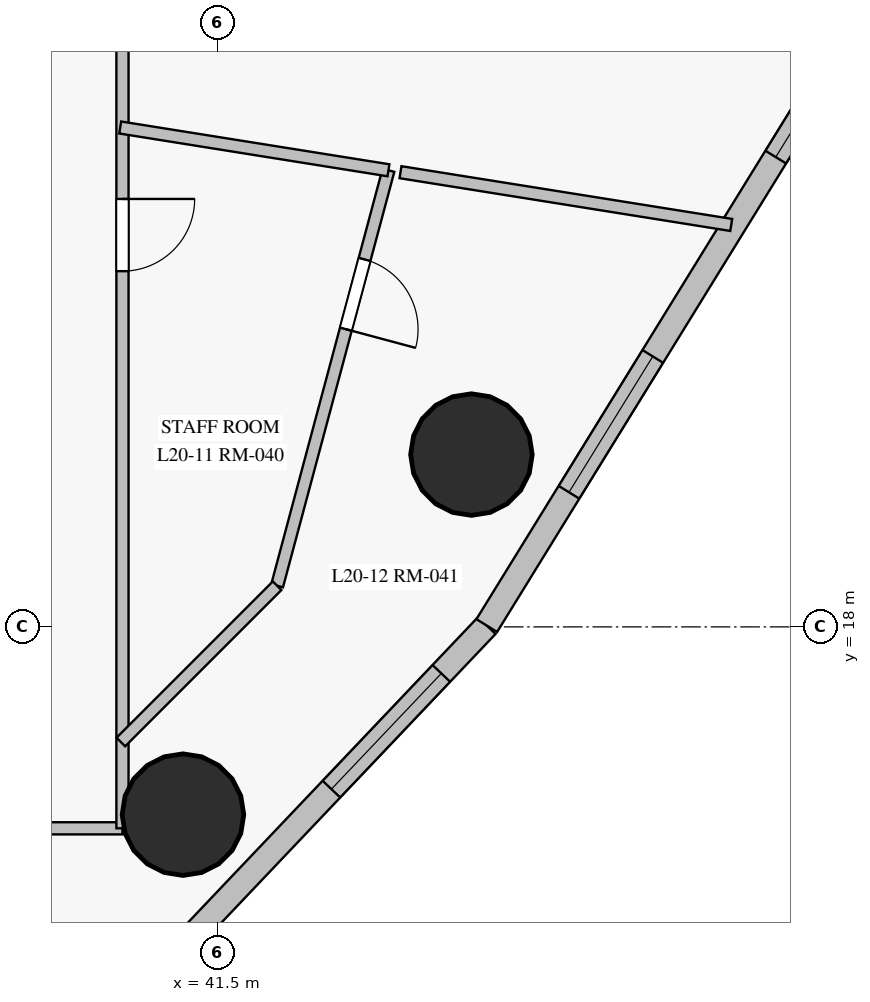
"""IFC4 building model, lengths in metres.
Left out: names, types, materials, properties, quantities, classifications, styles, units other than length and angle.
Written with IfcOpenShell. Run it as: python <this file> out.ifc"""

import sys

from ifc_helpers import new_model, si_unit, direction, frame, frame_2d, origin, origin_with_axes, origin_2d, place, context, subcontext, project, spatial, rectangle, circle, extrude, source, transform, mapped, element, fill, save


model = new_model("IFC4")
c1 = context("Model", 3, precision=1e-05, world=origin(), true_north=direction((0.0, 1.0)))
c2 = subcontext(c1, "Body", "Model", "MODEL_VIEW")
j1 = project(units=[si_unit("LENGTHUNIT", "METRE"), si_unit("PLANEANGLEUNIT", "RADIAN")], contexts=[c1])
p1 = place(None, origin())
s1 = spatial("IfcSite", under=j1, at=p1, CompositionType="ELEMENT")
p2 = place(p1, origin())
s2 = spatial("IfcBuilding", under=s1, at=p2, CompositionType="ELEMENT")
p3 = place(p2, frame((0.0, 0.0, 76.9)))
s3 = spatial("IfcBuildingStorey", under=s2, at=p3, CompositionType="ELEMENT", Elevation=76.9)
m1 = source(origin_with_axes(), c2, "Body", "SweptSolid", [
    extrude(circle(Radius=0.8, at=origin_2d()), origin(), (0.0, 0.0, 1.0), 3.6),
])
for number, where, z_axis, x_axis in (
    (1, (44.841, 20.267, 0.0), (0.0, 0.0, 1.0), (1.0, 0.0, 0.0)),
    (2, (41.046, 15.53, 0.0), (0.0, 0.0, 1.0), (1.0, 0.0, 0.0)),
):
    element("IfcColumn", number, at=place(p3, frame(where, z_axis=z_axis, x_axis=x_axis)), inside=s3, PredefinedType="COLUMN", context=c2, shape_type="MappedRepresentation", body=[
        mapped(m1, transform((0.0, 0.0, 0.0), scale=1.0)),
    ])
p4 = place(p3, frame((37.825, 10.417, 0.0), z_axis=(0.0, 0.0, 1.0), x_axis=(0.688609262867, 0.725132596905, 0.0)))
e3 = element("IfcWall", 3, at=p4, inside=s3, PredefinedType="SOLIDWALL", context=c2, shape_type="SweptSolid", body=[
    extrude(rectangle(XDim=10.481, YDim=0.32, at=frame_2d((5.241, 0.0))), origin(), (0.0, 0.0, 1.0), 3.35),
])
p5 = place(p4, frame((1.552, 0.0, 0.85)))
e4 = element("IfcOpeningElement", 4, at=p5, cuts=e3, PredefinedType="OPENING", context=c2, shape_type="SweptSolid", body=[
    extrude(rectangle(XDim=2.1, YDim=1.95, at=frame_2d((1.05, 0.975))), frame((0.0, 0.17, 0.0), z_axis=(0.0, -1.0, 0.0), x_axis=(1.0, 0.0, 0.0)), (0.0, 0.0, 1.0), 0.34),
])
p6 = place(p4, frame((7.513, 0.0, 0.85)))
e5 = element("IfcOpeningElement", 5, at=p6, cuts=e3, PredefinedType="OPENING", context=c2, shape_type="SweptSolid", body=[
    extrude(rectangle(XDim=2.1, YDim=1.95, at=frame_2d((1.05, 0.975))), frame((0.0, 0.17, 0.0), z_axis=(0.0, -1.0, 0.0), x_axis=(1.0, 0.0, 0.0)), (0.0, 0.0, 1.0), 0.34),
])
p7 = place(p3, frame((45.043, 18.018, 0.0), z_axis=(0.0, 0.0, 1.0), x_axis=(0.525018733496, 0.851090670539, 0.0)))
e6 = element("IfcWall", 6, at=p7, inside=s3, PredefinedType="SOLIDWALL", context=c2, shape_type="SweptSolid", body=[
    extrude(rectangle(XDim=15.076, YDim=0.32, at=frame_2d((7.538, 0.0))), origin(), (0.0, 0.0, 1.0), 3.35),
])
p8 = place(p7, frame((2.06, 0.0, 0.85)))
e7 = element("IfcOpeningElement", 7, at=p8, cuts=e6, PredefinedType="OPENING", context=c2, shape_type="SweptSolid", body=[
    extrude(rectangle(XDim=2.1, YDim=1.95, at=frame_2d((1.05, 0.975))), frame((0.0, 0.17, 0.0), z_axis=(0.0, -1.0, 0.0), x_axis=(1.0, 0.0, 0.0)), (0.0, 0.0, 1.0), 0.34),
])
p9 = place(p7, frame((7.241, 0.0, 0.85)))
e8 = element("IfcOpeningElement", 8, at=p9, cuts=e6, PredefinedType="OPENING", context=c2, shape_type="SweptSolid", body=[
    extrude(rectangle(XDim=2.1, YDim=1.95, at=frame_2d((1.05, 0.975))), frame((0.0, 0.17, 0.0), z_axis=(0.0, -1.0, 0.0), x_axis=(1.0, 0.0, 0.0)), (0.0, 0.0, 1.0), 0.34),
])
p10 = place(p7, frame((10.863, 0.0, 0.85)))
e9 = element("IfcOpeningElement", 9, at=p10, cuts=e6, PredefinedType="OPENING", context=c2, shape_type="SweptSolid", body=[
    extrude(rectangle(XDim=2.1, YDim=1.95, at=frame_2d((1.05, 0.975))), frame((0.0, 0.17, 0.0), z_axis=(0.0, -1.0, 0.0), x_axis=(1.0, 0.0, 0.0)), (0.0, 0.0, 1.0), 0.34),
])
p11 = place(p3, frame((40.25, 15.35, 0.0), z_axis=(0.0, 0.0, 1.0), x_axis=(-1.0, 0.0, 0.0)))
e10 = element("IfcWall", 10, at=p11, inside=s3, PredefinedType="PARTITIONING", context=c2, shape_type="SweptSolid", body=[
    extrude(rectangle(XDim=29.75, YDim=0.16, at=frame_2d((14.875, 0.0))), origin(), (0.0, 0.0, 1.0), 2.7),
])
p12 = place(p11, frame((26.037, 0.0, 0.0)))
e11 = element("IfcOpeningElement", 11, at=p12, cuts=e10, PredefinedType="OPENING", context=c2, shape_type="SweptSolid", body=[
    extrude(rectangle(XDim=0.96, YDim=2.15, at=frame_2d((0.48, 1.075))), frame((0.0, 0.09, 0.0), z_axis=(0.0, -1.0, 0.0), x_axis=(1.0, 0.0, 0.0)), (0.0, 0.0, 1.0), 0.18),
])
p13 = place(p11, frame((21.837, 0.0, 0.0)))
e12 = element("IfcOpeningElement", 12, at=p13, cuts=e10, PredefinedType="OPENING", context=c2, shape_type="SweptSolid", body=[
    extrude(rectangle(XDim=0.95, YDim=2.15, at=frame_2d((0.475, 1.075))), frame((0.0, 0.09, 0.0), z_axis=(0.0, -1.0, 0.0), x_axis=(1.0, 0.0, 0.0)), (0.0, 0.0, 1.0), 0.18),
])
p14 = place(p11, frame((17.721, 0.0, 0.0)))
e13 = element("IfcOpeningElement", 13, at=p14, cuts=e10, PredefinedType="OPENING", context=c2, shape_type="SweptSolid", body=[
    extrude(rectangle(XDim=0.95, YDim=2.15, at=frame_2d((0.475, 1.075))), frame((0.0, 0.09, 0.0), z_axis=(0.0, -1.0, 0.0), x_axis=(1.0, 0.0, 0.0)), (0.0, 0.0, 1.0), 0.18),
])
p15 = place(p11, frame((15.738, 0.0, 0.0)))
e14 = element("IfcOpeningElement", 14, at=p15, cuts=e10, PredefinedType="OPENING", context=c2, shape_type="SweptSolid", body=[
    extrude(rectangle(XDim=0.95, YDim=2.15, at=frame_2d((0.475, 1.075))), frame((0.0, 0.09, 0.0), z_axis=(0.0, -1.0, 0.0), x_axis=(1.0, 0.0, 0.0)), (0.0, 0.0, 1.0), 0.18),
])
p16 = place(p11, frame((14.06, 0.0, 0.0)))
e15 = element("IfcOpeningElement", 15, at=p16, cuts=e10, PredefinedType="OPENING", context=c2, shape_type="SweptSolid", body=[
    extrude(rectangle(XDim=0.95, YDim=2.15, at=frame_2d((0.475, 1.075))), frame((0.0, 0.09, 0.0), z_axis=(0.0, -1.0, 0.0), x_axis=(1.0, 0.0, 0.0)), (0.0, 0.0, 1.0), 0.18),
])
p17 = place(p11, frame((2.16, 0.0, 0.0)))
e16 = element("IfcOpeningElement", 16, at=p17, cuts=e10, PredefinedType="OPENING", context=c2, shape_type="SweptSolid", body=[
    extrude(rectangle(XDim=0.95, YDim=2.15, at=frame_2d((0.475, 1.075))), frame((0.0, 0.09, 0.0), z_axis=(0.0, -1.0, 0.0), x_axis=(1.0, 0.0, 0.0)), (0.0, 0.0, 1.0), 0.18),
])
p18 = place(p3, frame((40.25, 37.65, 0.0), z_axis=(0.0, 0.0, 1.0), x_axis=(0.0, -1.0, 0.0)))
e17 = element("IfcWall", 17, at=p18, inside=s3, PredefinedType="PARTITIONING", context=c2, shape_type="SweptSolid", body=[
    extrude(rectangle(XDim=22.3, YDim=0.16, at=frame_2d((11.15, 0.0))), origin(), (0.0, 0.0, 1.0), 2.75),
])
p19 = place(p18, frame((14.02, 0.0, 0.0)))
e18 = element("IfcOpeningElement", 18, at=p19, cuts=e17, PredefinedType="OPENING", context=c2, shape_type="SweptSolid", body=[
    extrude(rectangle(XDim=0.95, YDim=2.15, at=frame_2d((0.475, 1.075))), frame((0.0, 0.09, 0.0), z_axis=(0.0, -1.0, 0.0), x_axis=(1.0, 0.0, 0.0)), (0.0, 0.0, 1.0), 0.18),
])
p20 = place(p18, frame((10.675, 0.0, 0.0)))
e19 = element("IfcOpeningElement", 19, at=p20, cuts=e17, PredefinedType="OPENING", context=c2, shape_type="SweptSolid", body=[
    extrude(rectangle(XDim=0.95, YDim=2.15, at=frame_2d((0.475, 1.075))), frame((0.0, 0.09, 0.0), z_axis=(0.0, -1.0, 0.0), x_axis=(1.0, 0.0, 0.0)), (0.0, 0.0, 1.0), 0.18),
])
p21 = place(p18, frame((8.167, 0.0, 0.0)))
e20 = element("IfcOpeningElement", 20, at=p21, cuts=e17, PredefinedType="OPENING", context=c2, shape_type="SweptSolid", body=[
    extrude(rectangle(XDim=0.86, YDim=2.1, at=frame_2d((0.43, 1.05))), frame((0.0, 0.09, 0.0), z_axis=(0.0, -1.0, 0.0), x_axis=(1.0, 0.0, 0.0)), (0.0, 0.0, 1.0), 0.18),
])
p22 = place(p18, frame((5.49, 0.0, 0.0)))
e21 = element("IfcOpeningElement", 21, at=p22, cuts=e17, PredefinedType="OPENING", context=c2, shape_type="SweptSolid", body=[
    extrude(rectangle(XDim=0.95, YDim=2.15, at=frame_2d((0.475, 1.075))), frame((0.0, 0.09, 0.0), z_axis=(0.0, -1.0, 0.0), x_axis=(1.0, 0.0, 0.0)), (0.0, 0.0, 1.0), 0.18),
])
p23 = place(p18, frame((2.932, 0.0, 0.0)))
e22 = element("IfcOpeningElement", 22, at=p23, cuts=e17, PredefinedType="OPENING", context=c2, shape_type="SweptSolid", body=[
    extrude(rectangle(XDim=0.95, YDim=2.15, at=frame_2d((0.475, 1.075))), frame((0.0, 0.09, 0.0), z_axis=(0.0, -1.0, 0.0), x_axis=(1.0, 0.0, 0.0)), (0.0, 0.0, 1.0), 0.18),
])
p24 = place(p18, frame((6.622, 0.0, 0.0)))
e23 = element("IfcOpeningElement", 23, at=p24, cuts=e17, PredefinedType="OPENING", context=c2, shape_type="SweptSolid", body=[
    extrude(rectangle(XDim=0.95, YDim=2.15, at=frame_2d((0.475, 1.075))), frame((0.0, 0.09, 0.0), z_axis=(0.0, -1.0, 0.0), x_axis=(1.0, 0.0, 0.0)), (0.0, 0.0, 1.0), 0.18),
])
p25 = place(p3, frame((43.749, 24.007, 0.0), z_axis=(0.0, 0.0, 1.0), x_axis=(-0.258836010218, -0.96592128034, 0.0)))
e24 = element("IfcWall", 24, at=p25, inside=s3, PredefinedType="PARTITIONING", context=c2, shape_type="SweptSolid", body=[
    extrude(rectangle(XDim=5.658, YDim=0.16, at=frame_2d((2.829, 0.0))), origin(), (0.0, 0.0, 1.0), 2.75),
])
p26 = place(p25, frame((1.214, 0.0, 0.0)))
e25 = element("IfcOpeningElement", 25, at=p26, cuts=e24, PredefinedType="OPENING", context=c2, shape_type="SweptSolid", body=[
    extrude(rectangle(XDim=0.95, YDim=2.15, at=frame_2d((0.475, 1.075))), frame((0.0, 0.09, 0.0), z_axis=(0.0, -1.0, 0.0), x_axis=(1.0, 0.0, 0.0)), (0.0, 0.0, 1.0), 0.18),
])
p27 = place(p3, frame((43.908, 23.982, 0.0), z_axis=(0.0, 0.0, 1.0), x_axis=(0.98751279875, -0.157538796187, 0.0)))
e26 = element("IfcWall", 26, at=p27, inside=s3, PredefinedType="PARTITIONING", context=c2, shape_type="SweptSolid", body=[
    extrude(rectangle(XDim=4.406, YDim=0.16, at=frame_2d((2.203, 0.0))), origin(), (0.0, 0.0, 1.0), 3.35),
])
p28 = place(p3, frame((40.22, 24.57, 0.0), z_axis=(0.0, 0.0, 1.0), x_axis=(0.98751130527, -0.1575481576, 0.0)))
e27 = element("IfcWall", 27, at=p28, inside=s3, PredefinedType="PARTITIONING", context=c2, shape_type="SweptSolid", body=[
    extrude(rectangle(XDim=3.573, YDim=0.16, at=frame_2d((1.787, 0.0))), origin(), (0.0, 0.0, 1.0), 3.35),
])
p29 = place(p3, frame((42.285, 18.542, 0.0), z_axis=(0.0, 0.0, 1.0), x_axis=(-0.707106781187, -0.707106781187, 0.0)))
e28 = element("IfcWall", 28, at=p29, inside=s3, PredefinedType="PARTITIONING", context=c2, shape_type="SweptSolid", body=[
    extrude(rectangle(XDim=2.907, YDim=0.16, at=frame_2d((1.454, 0.0))), origin(), (0.0, 0.0, 1.0), 2.75),
])
m2 = source(origin_with_axes(), c2, "Body", "SweptSolid", [
    extrude(rectangle(XDim=2.1, YDim=1.95, at=frame_2d((1.05, 0.975))), frame((0.0, 0.03, 0.0), z_axis=(0.0, -1.0, 0.0), x_axis=(1.0, 0.0, 0.0)), (0.0, 0.0, 1.0), 0.06),
])
p30 = place(p6, origin())
e29 = element("IfcWindow", 29, at=p30, inside=s3, PartitioningType="SINGLE_PANEL", PredefinedType="WINDOW", context=c2, shape_type="MappedRepresentation", body=[
    mapped(m2, transform((0.0, 0.0, 0.0), scale=1.0)),
])
fill(e5, e29)
p31 = place(p8, origin())
e30 = element("IfcWindow", 30, at=p31, inside=s3, PartitioningType="SINGLE_PANEL", PredefinedType="WINDOW", context=c2, shape_type="MappedRepresentation", body=[
    mapped(m2, transform((0.0, 0.0, 0.0), scale=1.0)),
])
fill(e7, e30)
p32 = place(p9, origin())
e31 = element("IfcWindow", 31, at=p32, inside=s3, PartitioningType="SINGLE_PANEL", PredefinedType="WINDOW", context=c2, shape_type="MappedRepresentation", body=[
    mapped(m2, transform((0.0, 0.0, 0.0), scale=1.0)),
])
fill(e8, e31)
m3 = source(origin_with_axes(), c2, "Body", "SweptSolid", [
    extrude(rectangle(XDim=0.95, YDim=2.15, at=frame_2d((0.475, 1.075))), frame((0.0, 0.025, 0.0), z_axis=(0.0, -1.0, 0.0), x_axis=(1.0, 0.0, 0.0)), (0.0, 0.0, 1.0), 0.05),
])
p33 = place(p19, origin())
e32 = element("IfcDoor", 32, at=p33, inside=s3, OperationType="SINGLE_SWING_LEFT", PredefinedType="DOOR", context=c2, shape_type="MappedRepresentation", body=[
    mapped(m3, transform((0.0, 0.0, 0.0), scale=1.0)),
])
fill(e18, e32)
p34 = place(p26, origin())
e33 = element("IfcDoor", 33, at=p34, inside=s3, OperationType="SINGLE_SWING_RIGHT", PredefinedType="DOOR", context=c2, shape_type="MappedRepresentation", body=[
    mapped(m3, transform((0.0, 0.0, 0.0), scale=1.0)),
])
fill(e25, e33)
save(model, sys.argv[1])
